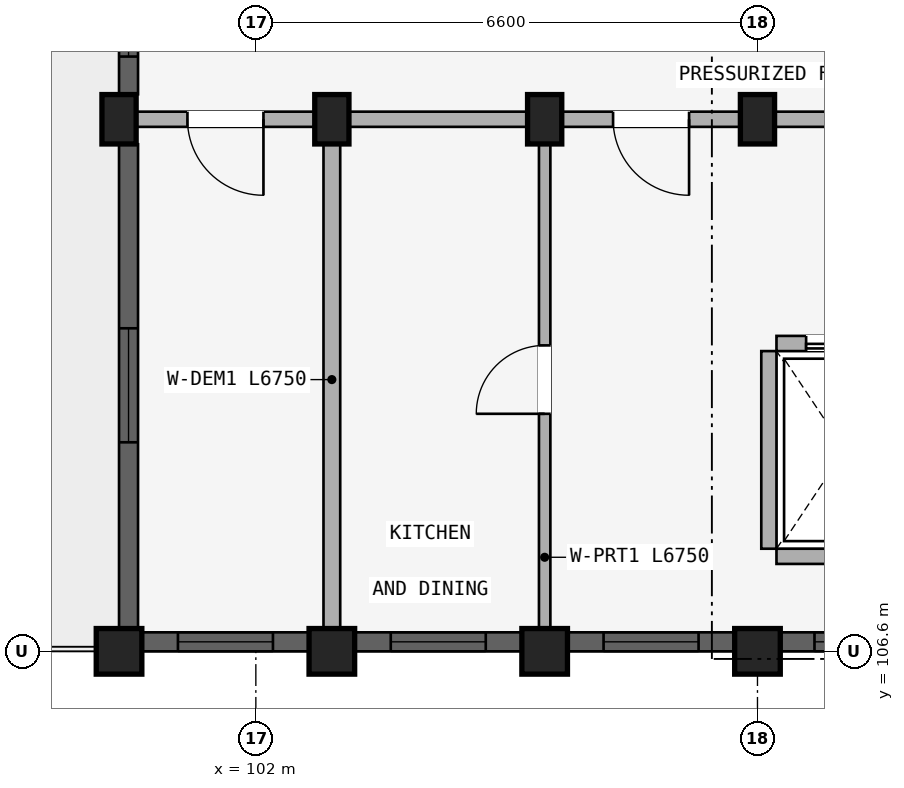
"""IFC4 building model, lengths in metres.
Left out: names, types, materials, properties, quantities, classifications, styles, units other than length and angle.
Written with IfcOpenShell. Run it as: python <this file> out.ifc"""

import sys

from ifc_helpers import new_model, si_unit, direction, frame, frame_2d, origin, origin_2d, place, context, subcontext, project, spatial, rectangle, extrude, element, fill, save


model = new_model("IFC4")
c1 = context("Model", 3, precision=1e-05, world=origin(), true_north=direction((0.0, 1.0)))
c2 = subcontext(c1, "Body", "Model", "MODEL_VIEW")
j1 = project(units=[si_unit("LENGTHUNIT", "METRE"), si_unit("PLANEANGLEUNIT", "RADIAN")], contexts=[c1])
p1 = place(None, origin())
s1 = spatial("IfcSite", under=j1, at=p1, CompositionType="ELEMENT")
p2 = place(p1, origin())
s2 = spatial("IfcBuilding", under=s1, at=p2, CompositionType="ELEMENT")
p3 = place(p2, frame((0.0, 0.0, 37.05)))
s3 = spatial("IfcBuildingStorey", under=s2, at=p3, CompositionType="ELEMENT", Elevation=37.05)
p4 = place(p3, frame((108.6, 106.6, 0.0), z_axis=(0.0, 0.0, 1.0), x_axis=(1.0, 0.0, 0.0)))
e1 = element("IfcColumn", 1, at=p4, inside=s3, PredefinedType="COLUMN", context=c2, shape_type="SweptSolid", body=[
    extrude(rectangle(XDim=0.6, YDim=0.6, at=origin_2d()), origin(), (0.0, 0.0, 1.0), 2.93),
])
p5 = place(p3, frame((108.6, 113.6, 0.0), z_axis=(0.0, 0.0, 1.0), x_axis=(1.0, 0.0, 0.0)))
e2 = element("IfcColumn", 2, at=p5, inside=s3, PredefinedType="COLUMN", context=c2, shape_type="SweptSolid", body=[
    extrude(rectangle(XDim=0.45, YDim=0.65, at=origin_2d()), origin(), (0.0, 0.0, 1.0), 2.93),
])
p6 = place(p3, frame((105.8, 106.6, 0.0), z_axis=(0.0, 0.0, 1.0), x_axis=(1.0, 0.0, 0.0)))
e3 = element("IfcColumn", 3, at=p6, inside=s3, PredefinedType="COLUMN", context=c2, shape_type="SweptSolid", body=[
    extrude(rectangle(XDim=0.6, YDim=0.6, at=origin_2d()), origin(), (0.0, 0.0, 1.0), 2.93),
])
p7 = place(p3, frame((105.8, 113.6, 0.0), z_axis=(0.0, 0.0, 1.0), x_axis=(1.0, 0.0, 0.0)))
e4 = element("IfcColumn", 4, at=p7, inside=s3, PredefinedType="COLUMN", context=c2, shape_type="SweptSolid", body=[
    extrude(rectangle(XDim=0.45, YDim=0.65, at=origin_2d()), origin(), (0.0, 0.0, 1.0), 2.93),
])
p8 = place(p3, frame((103.0, 106.6, 0.0), z_axis=(0.0, 0.0, 1.0), x_axis=(1.0, 0.0, 0.0)))
e5 = element("IfcColumn", 5, at=p8, inside=s3, PredefinedType="COLUMN", context=c2, shape_type="SweptSolid", body=[
    extrude(rectangle(XDim=0.6, YDim=0.6, at=origin_2d()), origin(), (0.0, 0.0, 1.0), 2.93),
])
p9 = place(p3, frame((103.0, 113.6, 0.0), z_axis=(0.0, 0.0, 1.0), x_axis=(1.0, 0.0, 0.0)))
e6 = element("IfcColumn", 6, at=p9, inside=s3, PredefinedType="COLUMN", context=c2, shape_type="SweptSolid", body=[
    extrude(rectangle(XDim=0.45, YDim=0.65, at=origin_2d()), origin(), (0.0, 0.0, 1.0), 2.93),
])
p10 = place(p3, frame((100.2, 106.6, 0.0), z_axis=(0.0, 0.0, 1.0), x_axis=(1.0, 0.0, 0.0)))
e7 = element("IfcColumn", 7, at=p10, inside=s3, PredefinedType="COLUMN", context=c2, shape_type="SweptSolid", body=[
    extrude(rectangle(XDim=0.6, YDim=0.6, at=origin_2d()), origin(), (0.0, 0.0, 1.0), 2.93),
])
p11 = place(p3, frame((100.2, 113.6, 0.0), z_axis=(0.0, 0.0, 1.0), x_axis=(1.0, 0.0, 0.0)))
e8 = element("IfcColumn", 8, at=p11, inside=s3, PredefinedType="COLUMN", context=c2, shape_type="SweptSolid", body=[
    extrude(rectangle(XDim=0.45, YDim=0.65, at=origin_2d()), origin(), (0.0, 0.0, 1.0), 2.93),
])
p12 = place(p3, frame((108.75, 107.95, 0.0), z_axis=(0.0, 0.0, 1.0), x_axis=(0.0, 1.0, 0.0)))
e9 = element("IfcWall", 9, at=p12, inside=s3, PredefinedType="STANDARD", context=c2, shape_type="SweptSolid", body=[
    extrude(rectangle(XDim=2.6, YDim=0.2, at=frame_2d((1.3, 0.0))), origin(), (0.0, 0.0, 1.0), 2.372),
])
p13 = place(p3, frame((110.65, 107.85, 0.0), z_axis=(0.0, 0.0, 1.0), x_axis=(-1.0, 0.0, 0.0)))
e10 = element("IfcWall", 10, at=p13, inside=s3, PredefinedType="STANDARD", context=c2, shape_type="SweptSolid", body=[
    extrude(rectangle(XDim=1.8, YDim=0.2, at=frame_2d((0.9, 0.0))), origin(), (0.0, 0.0, 1.0), 2.93),
])
p14 = place(p3, frame((110.65, 110.65, 0.0), z_axis=(0.0, 0.0, 1.0), x_axis=(-1.0, 0.0, 0.0)))
e11 = element("IfcWall", 11, at=p14, inside=s3, PredefinedType="STANDARD", context=c2, shape_type="SweptSolid", body=[
    extrude(rectangle(XDim=1.8, YDim=0.2, at=frame_2d((0.9, 0.0))), origin(), (0.0, 0.0, 1.0), 2.93),
])
p15 = place(p14, frame((0.39, 0.0, 0.0)))
e12 = element("IfcOpeningElement", 12, at=p15, cuts=e11, PredefinedType="OPENING", context=c2, shape_type="SweptSolid", body=[
    extrude(rectangle(XDim=1.02, YDim=2.15, at=frame_2d((0.51, 1.075))), frame((0.0, 0.11, 0.0), z_axis=(0.0, -1.0, 0.0), x_axis=(1.0, 0.0, 0.0)), (0.0, 0.0, 1.0), 0.22),
])
p16 = place(p3, frame((114.25, 113.6, 0.0), z_axis=(0.0, 0.0, 1.0), x_axis=(-1.0, 0.0, 0.0)))
e13 = element("IfcWall", 13, at=p16, inside=s3, PredefinedType="STANDARD", context=c2, shape_type="SweptSolid", body=[
    extrude(rectangle(XDim=5.6, YDim=0.2, at=frame_2d((2.8, 0.0))), origin(), (0.0, 0.0, 1.0), 2.372),
])
p17 = place(p16, frame((1.91, 0.0, 0.0)))
e14 = element("IfcOpeningElement", 14, at=p17, cuts=e13, PredefinedType="OPENING", context=c2, shape_type="SweptSolid", body=[
    extrude(rectangle(XDim=1.22, YDim=2.15, at=frame_2d((0.61, 1.075))), frame((0.0, 0.11, 0.0), z_axis=(0.0, -1.0, 0.0), x_axis=(1.0, 0.0, 0.0)), (0.0, 0.0, 1.0), 0.22),
])
p18 = place(p3, frame((108.6, 113.6, 0.0), z_axis=(0.0, 0.0, 1.0), x_axis=(-1.0, 0.0, 0.0)))
e15 = element("IfcWall", 15, at=p18, inside=s3, PredefinedType="STANDARD", context=c2, shape_type="SweptSolid", body=[
    extrude(rectangle(XDim=2.8, YDim=0.2, at=frame_2d((1.4, 0.0))), origin(), (0.0, 0.0, 1.0), 2.372),
])
p19 = place(p18, frame((0.9, 0.0, 0.0)))
e16 = element("IfcOpeningElement", 16, at=p19, cuts=e15, PredefinedType="OPENING", context=c2, shape_type="SweptSolid", body=[
    extrude(rectangle(XDim=1.0, YDim=2.15, at=frame_2d((0.5, 1.075))), frame((0.0, 0.11, 0.0), z_axis=(0.0, -1.0, 0.0), x_axis=(1.0, 0.0, 0.0)), (0.0, 0.0, 1.0), 0.22),
])
p20 = place(p3, frame((105.8, 113.6, 0.0), z_axis=(0.0, 0.0, 1.0), x_axis=(-1.0, 0.0, 0.0)))
e17 = element("IfcWall", 17, at=p20, inside=s3, PredefinedType="STANDARD", context=c2, shape_type="SweptSolid", body=[
    extrude(rectangle(XDim=2.8, YDim=0.2, at=frame_2d((1.4, 0.0))), origin(), (0.0, 0.0, 1.0), 2.372),
])
p21 = place(p3, frame((103.0, 113.6, 0.0), z_axis=(0.0, 0.0, 1.0), x_axis=(-1.0, 0.0, 0.0)))
e18 = element("IfcWall", 18, at=p21, inside=s3, PredefinedType="STANDARD", context=c2, shape_type="SweptSolid", body=[
    extrude(rectangle(XDim=2.8, YDim=0.2, at=frame_2d((1.4, 0.0))), origin(), (0.0, 0.0, 1.0), 2.372),
])
p22 = place(p21, frame((0.9, 0.0, 0.0)))
e19 = element("IfcOpeningElement", 19, at=p22, cuts=e18, PredefinedType="OPENING", context=c2, shape_type="SweptSolid", body=[
    extrude(rectangle(XDim=1.0, YDim=2.15, at=frame_2d((0.5, 1.075))), frame((0.0, 0.11, 0.0), z_axis=(0.0, -1.0, 0.0), x_axis=(1.0, 0.0, 0.0)), (0.0, 0.0, 1.0), 0.22),
])
p23 = place(p3, frame((105.8, 106.8, 0.0), z_axis=(0.0, 0.0, 1.0), x_axis=(0.0, 1.0, 0.0)))
e20 = element("IfcWall", 20, at=p23, inside=s3, PredefinedType="PARTITIONING", context=c2, shape_type="SweptSolid", body=[
    extrude(rectangle(XDim=6.75, YDim=0.15, at=frame_2d((3.375, 0.0))), origin(), (0.0, 0.0, 1.0), 2.372),
])
p24 = place(p23, frame((2.925, 0.0, 0.0)))
e21 = element("IfcOpeningElement", 21, at=p24, cuts=e20, PredefinedType="OPENING", context=c2, shape_type="SweptSolid", body=[
    extrude(rectangle(XDim=0.9, YDim=2.1, at=frame_2d((0.45, 1.05))), frame((0.0, 0.085, 0.0), z_axis=(0.0, -1.0, 0.0), x_axis=(1.0, 0.0, 0.0)), (0.0, 0.0, 1.0), 0.17),
])
p25 = place(p3, frame((103.0, 106.8, 0.0), z_axis=(0.0, 0.0, 1.0), x_axis=(0.0, 1.0, 0.0)))
e22 = element("IfcWall", 22, at=p25, inside=s3, PredefinedType="STANDARD", context=c2, shape_type="SweptSolid", body=[
    extrude(rectangle(XDim=6.75, YDim=0.22, at=frame_2d((3.375, 0.0))), origin(), (0.0, 0.0, 1.0), 2.372),
])
p26 = place(p3, frame((111.372, 106.725, 0.0), z_axis=(0.0, 0.0, 1.0), x_axis=(-1.0, 0.0, 0.0)))
e23 = element("IfcWall", 23, at=p26, inside=s3, PredefinedType="STANDARD", context=c2, shape_type="SweptSolid", body=[
    extrude(rectangle(XDim=2.468, YDim=0.25, at=frame_2d((1.234, 0.0))), origin(), (0.0, 0.0, 1.0), 2.472),
])
p27 = place(p26, frame((0.822, 0.0, 0.772)))
e24 = element("IfcOpeningElement", 24, at=p27, cuts=e23, PredefinedType="OPENING", context=c2, shape_type="SweptSolid", body=[
    extrude(rectangle(XDim=1.2, YDim=1.5, at=frame_2d((0.6, 0.75))), frame((0.0, 0.135, 0.0), z_axis=(0.0, -1.0, 0.0), x_axis=(1.0, 0.0, 0.0)), (0.0, 0.0, 1.0), 0.27),
])
p28 = place(p3, frame((108.296, 106.725, 0.0), z_axis=(0.0, 0.0, 1.0), x_axis=(-1.0, 0.0, 0.0)))
e25 = element("IfcWall", 25, at=p28, inside=s3, PredefinedType="STANDARD", context=c2, shape_type="SweptSolid", body=[
    extrude(rectangle(XDim=2.193, YDim=0.25, at=frame_2d((1.096, 0.0))), origin(), (0.0, 0.0, 1.0), 2.472),
])
p29 = place(p28, frame((0.471, 0.0, 0.722)))
e26 = element("IfcOpeningElement", 26, at=p29, cuts=e25, PredefinedType="OPENING", context=c2, shape_type="SweptSolid", body=[
    extrude(rectangle(XDim=1.25, YDim=1.55, at=frame_2d((0.625, 0.775))), frame((0.0, 0.135, 0.0), z_axis=(0.0, -1.0, 0.0), x_axis=(1.0, 0.0, 0.0)), (0.0, 0.0, 1.0), 0.27),
])
p30 = place(p3, frame((105.497, 106.725, 0.0), z_axis=(0.0, 0.0, 1.0), x_axis=(-1.0, 0.0, 0.0)))
e27 = element("IfcWall", 27, at=p30, inside=s3, PredefinedType="STANDARD", context=c2, shape_type="SweptSolid", body=[
    extrude(rectangle(XDim=2.193, YDim=0.25, at=frame_2d((1.097, 0.0))), origin(), (0.0, 0.0, 1.0), 2.472),
])
p31 = place(p30, frame((0.471, 0.0, 0.722)))
e28 = element("IfcOpeningElement", 28, at=p31, cuts=e27, PredefinedType="OPENING", context=c2, shape_type="SweptSolid", body=[
    extrude(rectangle(XDim=1.25, YDim=1.55, at=frame_2d((0.625, 0.775))), frame((0.0, 0.135, 0.0), z_axis=(0.0, -1.0, 0.0), x_axis=(1.0, 0.0, 0.0)), (0.0, 0.0, 1.0), 0.27),
])
p32 = place(p3, frame((102.697, 106.725, 0.0), z_axis=(0.0, 0.0, 1.0), x_axis=(-1.0, 0.0, 0.0)))
e29 = element("IfcWall", 29, at=p32, inside=s3, PredefinedType="STANDARD", context=c2, shape_type="SweptSolid", body=[
    extrude(rectangle(XDim=2.193, YDim=0.25, at=frame_2d((1.097, 0.0))), origin(), (0.0, 0.0, 1.0), 2.472),
])
p33 = place(p32, frame((0.471, 0.0, 0.722)))
e30 = element("IfcOpeningElement", 30, at=p33, cuts=e29, PredefinedType="OPENING", context=c2, shape_type="SweptSolid", body=[
    extrude(rectangle(XDim=1.25, YDim=1.55, at=frame_2d((0.625, 0.775))), frame((0.0, 0.135, 0.0), z_axis=(0.0, -1.0, 0.0), x_axis=(1.0, 0.0, 0.0)), (0.0, 0.0, 1.0), 0.27),
])
p34 = place(p3, frame((100.325, 106.904, 0.0), z_axis=(0.0, 0.0, 1.0), x_axis=(0.0, 1.0, 0.0)))
e31 = element("IfcWall", 31, at=p34, inside=s3, PredefinedType="STANDARD", context=c2, shape_type="SweptSolid", body=[
    extrude(rectangle(XDim=6.368, YDim=0.25, at=frame_2d((3.184, 0.0))), origin(), (0.0, 0.0, 1.0), 2.372),
])
p35 = place(p34, frame((2.447, 0.0, 0.522)))
e32 = element("IfcOpeningElement", 32, at=p35, cuts=e31, PredefinedType="OPENING", context=c2, shape_type="SweptSolid", body=[
    extrude(rectangle(XDim=1.5, YDim=1.65, at=frame_2d((0.75, 0.825))), frame((0.0, 0.135, 0.0), z_axis=(0.0, -1.0, 0.0), x_axis=(1.0, 0.0, 0.0)), (0.0, 0.0, 1.0), 0.27),
])
p36 = place(p3, frame((100.325, 113.928, 0.0), z_axis=(0.0, 0.0, 1.0), x_axis=(0.0, 1.0, 0.0)))
e33 = element("IfcWall", 33, at=p36, inside=s3, PredefinedType="STANDARD", context=c2, shape_type="SweptSolid", body=[
    extrude(rectangle(XDim=1.743, YDim=0.25, at=frame_2d((0.872, 0.0))), origin(), (0.0, 0.0, 1.0), 2.372),
])
p37 = place(p36, frame((0.497, 0.0, 0.88)))
e34 = element("IfcOpeningElement", 34, at=p37, cuts=e33, PredefinedType="OPENING", context=c2, shape_type="SweptSolid", body=[
    extrude(rectangle(XDim=0.75, YDim=1.05, at=frame_2d((0.375, 0.525))), frame((0.0, 0.135, 0.0), z_axis=(0.0, -1.0, 0.0), x_axis=(1.0, 0.0, 0.0)), (0.0, 0.0, 1.0), 0.27),
])
p38 = place(p27, origin())
e35 = element("IfcWindow", 35, at=p38, inside=s3, PartitioningType="SINGLE_PANEL", PredefinedType="WINDOW", context=c2, shape_type="SweptSolid", body=[
    extrude(rectangle(XDim=1.2, YDim=1.5, at=frame_2d((0.6, 0.75))), frame((0.0, 0.03, 0.0), z_axis=(0.0, -1.0, 0.0), x_axis=(1.0, 0.0, 0.0)), (0.0, 0.0, 1.0), 0.06),
])
fill(e24, e35)
p39 = place(p29, origin())
e36 = element("IfcWindow", 36, at=p39, inside=s3, PartitioningType="SINGLE_PANEL", PredefinedType="WINDOW", context=c2, shape_type="SweptSolid", body=[
    extrude(rectangle(XDim=1.25, YDim=1.55, at=frame_2d((0.625, 0.775))), frame((0.0, 0.03, 0.0), z_axis=(0.0, -1.0, 0.0), x_axis=(1.0, 0.0, 0.0)), (0.0, 0.0, 1.0), 0.06),
])
fill(e26, e36)
p40 = place(p31, origin())
e37 = element("IfcWindow", 37, at=p40, inside=s3, PartitioningType="SINGLE_PANEL", PredefinedType="WINDOW", context=c2, shape_type="SweptSolid", body=[
    extrude(rectangle(XDim=1.25, YDim=1.55, at=frame_2d((0.625, 0.775))), frame((0.0, 0.03, 0.0), z_axis=(0.0, -1.0, 0.0), x_axis=(1.0, 0.0, 0.0)), (0.0, 0.0, 1.0), 0.06),
])
fill(e28, e37)
p41 = place(p33, origin())
e38 = element("IfcWindow", 38, at=p41, inside=s3, PartitioningType="SINGLE_PANEL", PredefinedType="WINDOW", context=c2, shape_type="SweptSolid", body=[
    extrude(rectangle(XDim=1.25, YDim=1.55, at=frame_2d((0.625, 0.775))), frame((0.0, 0.03, 0.0), z_axis=(0.0, -1.0, 0.0), x_axis=(1.0, 0.0, 0.0)), (0.0, 0.0, 1.0), 0.06),
])
fill(e30, e38)
p42 = place(p35, origin())
e39 = element("IfcWindow", 39, at=p42, inside=s3, PartitioningType="DOUBLE_PANEL_VERTICAL", PredefinedType="WINDOW", context=c2, shape_type="SweptSolid", body=[
    extrude(rectangle(XDim=1.5, YDim=1.65, at=frame_2d((0.75, 0.825))), frame((0.0, 0.03, 0.0), z_axis=(0.0, -1.0, 0.0), x_axis=(1.0, 0.0, 0.0)), (0.0, 0.0, 1.0), 0.06),
])
fill(e32, e39)
p43 = place(p37, origin())
e40 = element("IfcWindow", 40, at=p43, inside=s3, PartitioningType="SINGLE_PANEL", PredefinedType="WINDOW", context=c2, shape_type="SweptSolid", body=[
    extrude(rectangle(XDim=0.75, YDim=1.05, at=frame_2d((0.375, 0.525))), frame((0.0, 0.03, 0.0), z_axis=(0.0, -1.0, 0.0), x_axis=(1.0, 0.0, 0.0)), (0.0, 0.0, 1.0), 0.06),
])
fill(e34, e40)
p44 = place(p15, origin())
e41 = element("IfcDoor", 41, at=p44, inside=s3, OperationType="SLIDING_TO_RIGHT", PredefinedType="DOOR", context=c2, shape_type="SweptSolid", body=[
    extrude(rectangle(XDim=1.02, YDim=2.15, at=frame_2d((0.51, 1.075))), frame((0.0, 0.025, 0.0), z_axis=(0.0, -1.0, 0.0), x_axis=(1.0, 0.0, 0.0)), (0.0, 0.0, 1.0), 0.05),
])
fill(e12, e41)
p45 = place(p19, origin())
e42 = element("IfcDoor", 42, at=p45, inside=s3, OperationType="SINGLE_SWING_LEFT", PredefinedType="DOOR", context=c2, shape_type="SweptSolid", body=[
    extrude(rectangle(XDim=1.0, YDim=2.15, at=frame_2d((0.5, 1.075))), frame((0.0, 0.025, 0.0), z_axis=(0.0, -1.0, 0.0), x_axis=(1.0, 0.0, 0.0)), (0.0, 0.0, 1.0), 0.05),
])
fill(e16, e42)
p46 = place(p22, origin())
e43 = element("IfcDoor", 43, at=p46, inside=s3, OperationType="SINGLE_SWING_LEFT", PredefinedType="DOOR", context=c2, shape_type="SweptSolid", body=[
    extrude(rectangle(XDim=1.0, YDim=2.15, at=frame_2d((0.5, 1.075))), frame((0.0, 0.025, 0.0), z_axis=(0.0, -1.0, 0.0), x_axis=(1.0, 0.0, 0.0)), (0.0, 0.0, 1.0), 0.05),
])
fill(e19, e43)
p47 = place(p24, origin())
e44 = element("IfcDoor", 44, at=p47, inside=s3, OperationType="SINGLE_SWING_LEFT", PredefinedType="DOOR", context=c2, shape_type="SweptSolid", body=[
    extrude(rectangle(XDim=0.9, YDim=2.1, at=frame_2d((0.45, 1.05))), frame((0.0, 0.025, 0.0), z_axis=(0.0, -1.0, 0.0), x_axis=(1.0, 0.0, 0.0)), (0.0, 0.0, 1.0), 0.05),
])
fill(e21, e44)
save(model, sys.argv[1])
